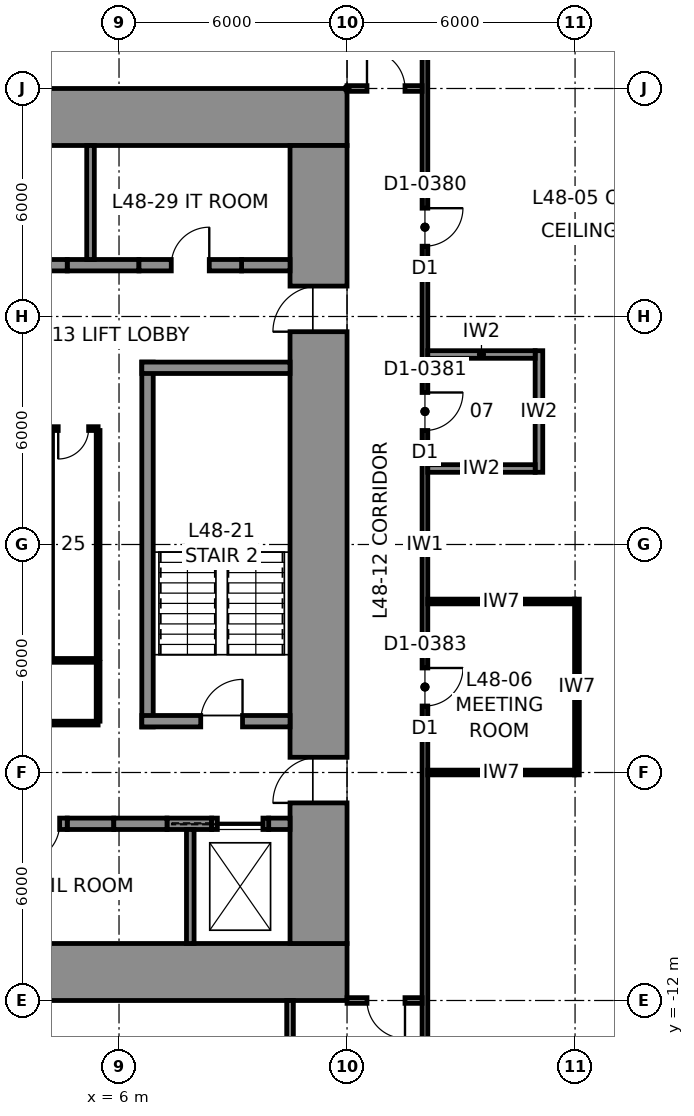
"""IFC4 building model, lengths in metres.
Left out: names, types, materials, properties, quantities, classifications, styles, units other than length and angle.
Written with IfcOpenShell. Run it as: python <this file> out.ifc"""

import sys

from ifc_helpers import new_model, si_unit, direction, frame, frame_2d, origin, place, context, subcontext, project, spatial, rectangle, extrude, element, fill, save


model = new_model("IFC4")
c1 = context("Model", 3, precision=1e-05, world=origin(), true_north=direction((0.0, 1.0)))
c2 = subcontext(c1, "Body", "Model", "MODEL_VIEW")
j1 = project(units=[si_unit("LENGTHUNIT", "METRE"), si_unit("PLANEANGLEUNIT", "RADIAN")], contexts=[c1])
p1 = place(None, origin())
s1 = spatial("IfcSite", under=j1, at=p1, CompositionType="ELEMENT")
p2 = place(p1, origin())
s2 = spatial("IfcBuilding", under=s1, at=p2, CompositionType="ELEMENT")
p3 = place(p2, frame((0.0, 0.0, 221.8)))
s3 = spatial("IfcBuildingStorey", under=s2, at=p3, CompositionType="ELEMENT", Elevation=221.8)
for number, where, z_axis, x_axis in (
    (1, (-12.0, 11.25, 0.0), (0.0, 0.0, 1.0), (1.0, 0.0, 0.0)),
    (2, (12.0, -11.25, 0.0), (0.0, 0.0, 1.0), (-1.0, 0.0, 0.0)),
):
    element("IfcWall", number, at=place(p3, frame(where, z_axis=z_axis, x_axis=x_axis)), inside=s3, PredefinedType="SHEAR", context=c2, shape_type="SweptSolid", body=[
        extrude(rectangle(XDim=24.0, YDim=1.5, at=frame_2d((12.0, 0.0))), origin(), (0.0, 0.0, 1.0), 4.0),
    ])
p4 = place(p3, frame((11.25, 10.5, 0.0), z_axis=(0.0, 0.0, 1.0), x_axis=(0.0, -1.0, 0.0)))
e3 = element("IfcWall", 3, at=p4, inside=s3, PredefinedType="SHEAR", context=c2, shape_type="SweptSolid", body=[
    extrude(rectangle(XDim=21.0, YDim=1.5, at=frame_2d((10.5, 0.0))), origin(), (0.0, 0.0, 1.0), 4.0),
])
p5 = place(p4, frame((3.7, 0.0, 0.0)))
e4 = element("IfcOpeningElement", 4, at=p5, cuts=e3, PredefinedType="OPENING", context=c2, shape_type="SweptSolid", body=[
    extrude(rectangle(XDim=1.2, YDim=2.3, at=frame_2d((0.6, 1.15))), frame((0.0, 0.76, 0.0), z_axis=(0.0, -1.0, 0.0), x_axis=(1.0, 0.0, 0.0)), (0.0, 0.0, 1.0), 1.52),
])
p6 = place(p4, frame((16.1, 0.0, 0.0)))
e5 = element("IfcOpeningElement", 5, at=p6, cuts=e3, PredefinedType="OPENING", context=c2, shape_type="SweptSolid", body=[
    extrude(rectangle(XDim=1.2, YDim=2.3, at=frame_2d((0.6, 1.15))), frame((0.0, 0.76, 0.0), z_axis=(0.0, -1.0, 0.0), x_axis=(1.0, 0.0, 0.0)), (0.0, 0.0, 1.0), 1.52),
])
p7 = place(p3, frame((4.637, 7.35, 0.0), z_axis=(0.0, 0.0, 1.0), x_axis=(1.0, 0.0, 0.0)))
e6 = element("IfcWall", 6, at=p7, inside=s3, PredefinedType="SHEAR", context=c2, shape_type="SweptSolid", body=[
    extrude(rectangle(XDim=1.887, YDim=0.3, at=frame_2d((0.944, 0.0))), origin(), (0.0, 0.0, 1.0), 4.0),
])
p8 = place(p3, frame((9.225, 7.35, 0.0), z_axis=(0.0, 0.0, 1.0), x_axis=(1.0, 0.0, 0.0)))
e7 = element("IfcWall", 7, at=p8, inside=s3, PredefinedType="SHEAR", context=c2, shape_type="SweptSolid", body=[
    extrude(rectangle(XDim=1.275, YDim=0.3, at=frame_2d((0.637, 0.0))), origin(), (0.0, 0.0, 1.0), 4.0),
])
p9 = place(p3, frame((3.238, 7.35, 0.0), z_axis=(0.0, 0.0, 1.0), x_axis=(1.0, 0.0, 0.0)))
e8 = element("IfcWall", 8, at=p9, inside=s3, PredefinedType="PARTITIONING", context=c2, shape_type="SweptSolid", body=[
    extrude(rectangle(XDim=1.4, YDim=0.3, at=frame_2d((0.7, 0.0))), origin(), (0.0, 0.0, 1.0), 4.0),
])
p10 = place(p3, frame((6.525, 7.35, 0.0), z_axis=(0.0, 0.0, 1.0), x_axis=(1.0, 0.0, 0.0)))
e9 = element("IfcWall", 9, at=p10, inside=s3, PredefinedType="PARTITIONING", context=c2, shape_type="SweptSolid", body=[
    extrude(rectangle(XDim=2.7, YDim=0.3, at=frame_2d((1.35, 0.0))), origin(), (0.0, 0.0, 1.0), 4.0),
])
p11 = place(p10, frame((0.85, 0.0, 0.0)))
e10 = element("IfcOpeningElement", 10, at=p11, cuts=e9, PredefinedType="OPENING", context=c2, shape_type="SweptSolid", body=[
    extrude(rectangle(XDim=1.0, YDim=2.3, at=frame_2d((0.5, 1.15))), frame((0.0, 0.16, 0.0), z_axis=(0.0, -1.0, 0.0), x_axis=(1.0, 0.0, 0.0)), (0.0, 0.0, 1.0), 0.32),
])
p12 = place(p3, frame((5.25, 7.5, 0.0), z_axis=(0.0, 0.0, 1.0), x_axis=(0.0, 1.0, 0.0)))
e11 = element("IfcWall", 11, at=p12, inside=s3, PredefinedType="PARTITIONING", context=c2, shape_type="SweptSolid", body=[
    extrude(rectangle(XDim=3.0, YDim=0.2, at=frame_2d((1.5, 0.0))), origin(), (0.0, 0.0, 1.0), 4.0),
])
p13 = place(p3, frame((4.637, -7.35, 0.0), z_axis=(0.0, 0.0, 1.0), x_axis=(1.0, 0.0, 0.0)))
e12 = element("IfcWall", 12, at=p13, inside=s3, PredefinedType="SHEAR", context=c2, shape_type="SweptSolid", body=[
    extrude(rectangle(XDim=1.225, YDim=0.3, at=frame_2d((0.613, 0.0))), origin(), (0.0, 0.0, 1.0), 4.0),
])
p14 = place(p3, frame((7.262, -7.35, 0.0), z_axis=(0.0, 0.0, 1.0), x_axis=(1.0, 0.0, 0.0)))
e13 = element("IfcWall", 13, at=p14, inside=s3, PredefinedType="SHEAR", context=c2, shape_type="SweptSolid", body=[
    extrude(rectangle(XDim=1.175, YDim=0.3, at=frame_2d((0.587, 0.0))), origin(), (0.0, 0.0, 1.0), 4.0),
])
p15 = place(p3, frame((9.938, -7.35, 0.0), z_axis=(0.0, 0.0, 1.0), x_axis=(1.0, 0.0, 0.0)))
e14 = element("IfcWall", 14, at=p15, inside=s3, PredefinedType="SHEAR", context=c2, shape_type="SweptSolid", body=[
    extrude(rectangle(XDim=0.562, YDim=0.3, at=frame_2d((0.281, 0.0))), origin(), (0.0, 0.0, 1.0), 4.0),
])
p16 = place(p3, frame((3.238, -7.35, 0.0), z_axis=(0.0, 0.0, 1.0), x_axis=(1.0, 0.0, 0.0)))
e15 = element("IfcWall", 15, at=p16, inside=s3, PredefinedType="PARTITIONING", context=c2, shape_type="SweptSolid", body=[
    extrude(rectangle(XDim=1.4, YDim=0.3, at=frame_2d((0.7, 0.0))), origin(), (0.0, 0.0, 1.0), 4.0),
])
p17 = place(p16, frame((0.2, 0.0, 0.0)))
e16 = element("IfcOpeningElement", 16, at=p17, cuts=e15, PredefinedType="OPENING", context=c2, shape_type="SweptSolid", body=[
    extrude(rectangle(XDim=1.0, YDim=2.3, at=frame_2d((0.5, 1.15))), frame((0.0, 0.16, 0.0), z_axis=(0.0, -1.0, 0.0), x_axis=(1.0, 0.0, 0.0)), (0.0, 0.0, 1.0), 0.32),
])
p18 = place(p3, frame((5.863, -7.35, 0.0), z_axis=(0.0, 0.0, 1.0), x_axis=(1.0, 0.0, 0.0)))
e17 = element("IfcWall", 17, at=p18, inside=s3, PredefinedType="PARTITIONING", context=c2, shape_type="SweptSolid", body=[
    extrude(rectangle(XDim=1.4, YDim=0.3, at=frame_2d((0.7, 0.0))), origin(), (0.0, 0.0, 1.0), 4.0),
])
p19 = place(p3, frame((8.438, -7.35, 0.0), z_axis=(0.0, 0.0, 1.0), x_axis=(1.0, 0.0, 0.0)))
e18 = element("IfcWall", 18, at=p19, inside=s3, PredefinedType="PARTITIONING", context=c2, shape_type="SweptSolid", body=[
    extrude(rectangle(XDim=1.5, YDim=0.3, at=frame_2d((0.75, 0.0))), origin(), (0.0, 0.0, 1.0), 4.0),
])
p20 = place(p19, frame((0.15, 0.0, 0.0)))
e19 = element("IfcOpeningElement", 19, at=p20, cuts=e18, PredefinedType="OPENING", context=c2, shape_type="SweptSolid", body=[
    extrude(rectangle(XDim=1.2, YDim=2.3, at=frame_2d((0.6, 1.15))), frame((0.0, 0.16, 0.0), z_axis=(0.0, -1.0, 0.0), x_axis=(1.0, 0.0, 0.0)), (0.0, 0.0, 1.0), 0.32),
])
p21 = place(p3, frame((7.875, -10.5, 0.0), z_axis=(0.0, 0.0, 1.0), x_axis=(0.0, 1.0, 0.0)))
e20 = element("IfcWall", 20, at=p21, inside=s3, PredefinedType="PARTITIONING", context=c2, shape_type="SweptSolid", body=[
    extrude(rectangle(XDim=3.0, YDim=0.2, at=frame_2d((1.5, 0.0))), origin(), (0.0, 0.0, 1.0), 4.0),
])
p22 = place(p3, frame((14.05, -13.575, 0.0), z_axis=(0.0, 0.0, 1.0), x_axis=(0.0, 1.0, 0.0)))
e21 = element("IfcWall", 21, at=p22, inside=s3, PredefinedType="PARTITIONING", context=c2, shape_type="SweptSolid", body=[
    extrude(rectangle(XDim=27.15, YDim=0.15, at=frame_2d((13.575, 0.0))), origin(), (0.0, 0.0, 1.0), 3.83),
])
p23 = place(p22, frame((21.425, 0.0, 0.0)))
e22 = element("IfcOpeningElement", 22, at=p23, cuts=e21, PredefinedType="OPENING", context=c2, shape_type="SweptSolid", body=[
    extrude(rectangle(XDim=1.0, YDim=2.3, at=frame_2d((0.5, 1.15))), frame((0.0, 0.085, 0.0), z_axis=(0.0, -1.0, 0.0), x_axis=(1.0, 0.0, 0.0)), (0.0, 0.0, 1.0), 0.17),
])
p24 = place(p22, frame((9.325, 0.0, 0.0)))
e23 = element("IfcOpeningElement", 23, at=p24, cuts=e21, PredefinedType="OPENING", context=c2, shape_type="SweptSolid", body=[
    extrude(rectangle(XDim=1.0, YDim=2.3, at=frame_2d((0.5, 1.15))), frame((0.0, 0.085, 0.0), z_axis=(0.0, -1.0, 0.0), x_axis=(1.0, 0.0, 0.0)), (0.0, 0.0, 1.0), 0.17),
])
p25 = place(p22, frame((16.575, 0.0, 0.0)))
e24 = element("IfcOpeningElement", 24, at=p25, cuts=e21, PredefinedType="OPENING", context=c2, shape_type="SweptSolid", body=[
    extrude(rectangle(XDim=1.0, YDim=2.3, at=frame_2d((0.5, 1.15))), frame((0.0, 0.085, 0.0), z_axis=(0.0, -1.0, 0.0), x_axis=(1.0, 0.0, 0.0)), (0.0, 0.0, 1.0), 0.17),
])
p26 = place(p3, frame((12.0, 12.0, 0.0), z_axis=(0.0, 0.0, 1.0), x_axis=(1.0, 0.0, 0.0)))
e25 = element("IfcWall", 25, at=p26, inside=s3, PredefinedType="PARTITIONING", context=c2, shape_type="SweptSolid", body=[
    extrude(rectangle(XDim=1.975, YDim=0.15, at=frame_2d((0.988, 0.0))), origin(), (0.0, 0.0, 1.0), 3.83),
])
p27 = place(p26, frame((0.525, 0.0, 0.0)))
e26 = element("IfcOpeningElement", 26, at=p27, cuts=e25, PredefinedType="OPENING", context=c2, shape_type="SweptSolid", body=[
    extrude(rectangle(XDim=1.0, YDim=2.3, at=frame_2d((0.5, 1.15))), frame((0.0, 0.085, 0.0), z_axis=(0.0, -1.0, 0.0), x_axis=(1.0, 0.0, 0.0)), (0.0, 0.0, 1.0), 0.17),
])
p28 = place(p3, frame((13.975, -12.0, 0.0), z_axis=(0.0, 0.0, 1.0), x_axis=(-1.0, 0.0, 0.0)))
e27 = element("IfcWall", 27, at=p28, inside=s3, PredefinedType="PARTITIONING", context=c2, shape_type="SweptSolid", body=[
    extrude(rectangle(XDim=1.975, YDim=0.15, at=frame_2d((0.988, 0.0))), origin(), (0.0, 0.0, 1.0), 3.83),
])
p29 = place(p28, frame((0.45, 0.0, 0.0)))
e28 = element("IfcOpeningElement", 28, at=p29, cuts=e27, PredefinedType="OPENING", context=c2, shape_type="SweptSolid", body=[
    extrude(rectangle(XDim=1.0, YDim=2.3, at=frame_2d((0.5, 1.15))), frame((0.0, 0.085, 0.0), z_axis=(0.0, -1.0, 0.0), x_axis=(1.0, 0.0, 0.0)), (0.0, 0.0, 1.0), 0.17),
])
p30 = place(p3, frame((10.5, -12.0, 0.0), z_axis=(0.0, 0.0, 1.0), x_axis=(0.0, -1.0, 0.0)))
e29 = element("IfcWall", 29, at=p30, inside=s3, PredefinedType="PARTITIONING", context=c2, shape_type="SweptSolid", body=[
    extrude(rectangle(XDim=11.15, YDim=0.175, at=frame_2d((5.575, 0.0))), origin(), (0.0, 0.0, 1.0), 3.83),
])
p31 = place(p3, frame((18.05, -6.062, 0.0), z_axis=(0.0, 0.0, 1.0), x_axis=(0.0, 1.0, 0.0)))
e30 = element("IfcWall", 30, at=p31, inside=s3, PredefinedType="PARTITIONING", context=c2, shape_type="SweptSolid", body=[
    extrude(rectangle(XDim=4.625, YDim=0.125, at=frame_2d((2.312, 0.0))), origin(), (0.0, 0.0, 1.0), 3.83),
])
for number, where, z_axis, x_axis in (
    (31, (14.125, -6.0, 0.0), (0.0, 0.0, 1.0), (1.0, 0.0, 0.0)),
    (32, (14.125, -1.5, 0.0), (0.0, 0.0, 1.0), (1.0, 0.0, 0.0)),
):
    element("IfcWall", number, at=place(p3, frame(where, z_axis=z_axis, x_axis=x_axis)), inside=s3, PredefinedType="PARTITIONING", context=c2, shape_type="SweptSolid", body=[
        extrude(rectangle(XDim=3.863, YDim=0.125, at=frame_2d((1.931, 0.0))), origin(), (0.0, 0.0, 1.0), 3.83),
    ])
p32 = place(p3, frame((17.05, 1.9, 0.0), z_axis=(0.0, 0.0, 1.0), x_axis=(0.0, 1.0, 0.0)))
e33 = element("IfcWall", 33, at=p32, inside=s3, PredefinedType="PARTITIONING", context=c2, shape_type="SweptSolid", body=[
    extrude(rectangle(XDim=3.2, YDim=0.2, at=frame_2d((1.6, 0.0))), origin(), (0.0, 0.0, 1.0), 3.83),
])
for number, where, z_axis, x_axis in (
    (34, (14.125, 2.0, 0.0), (0.0, 0.0, 1.0), (1.0, 0.0, 0.0)),
    (35, (14.125, 5.0, 0.0), (0.0, 0.0, 1.0), (1.0, 0.0, 0.0)),
):
    element("IfcWall", number, at=place(p3, frame(where, z_axis=z_axis, x_axis=x_axis)), inside=s3, PredefinedType="PARTITIONING", context=c2, shape_type="SweptSolid", body=[
        extrude(rectangle(XDim=2.825, YDim=0.2, at=frame_2d((1.413, 0.0))), origin(), (0.0, 0.0, 1.0), 3.83),
    ])
p33 = place(p3, frame((6.75, -4.8, 0.0), z_axis=(0.0, 0.0, 1.0), x_axis=(0.0, 1.0, 0.0)))
e36 = element("IfcWall", 36, at=p33, inside=s3, PredefinedType="SOLIDWALL", context=c2, shape_type="SweptSolid", body=[
    extrude(rectangle(XDim=9.6, YDim=0.3, at=frame_2d((4.8, 0.0))), origin(), (0.0, 0.0, 1.0), 3.75),
])
p34 = place(p3, frame((6.6, 4.65, 0.0), z_axis=(0.0, 0.0, 1.0), x_axis=(1.0, 0.0, 0.0)))
e37 = element("IfcWall", 37, at=p34, inside=s3, PredefinedType="SOLIDWALL", context=c2, shape_type="SweptSolid", body=[
    extrude(rectangle(XDim=3.9, YDim=0.3, at=frame_2d((1.95, 0.0))), origin(), (0.0, 0.0, 1.0), 3.75),
])
p35 = place(p3, frame((10.5, -4.65, 0.0), z_axis=(0.0, 0.0, 1.0), x_axis=(-1.0, 0.0, 0.0)))
e38 = element("IfcWall", 38, at=p35, inside=s3, PredefinedType="SOLIDWALL", context=c2, shape_type="SweptSolid", body=[
    extrude(rectangle(XDim=3.9, YDim=0.3, at=frame_2d((1.95, 0.0))), origin(), (0.0, 0.0, 1.0), 3.75),
])
p36 = place(p35, frame((1.25, 0.0, 0.0)))
e39 = element("IfcOpeningElement", 39, at=p36, cuts=e38, PredefinedType="OPENING", context=c2, shape_type="SweptSolid", body=[
    extrude(rectangle(XDim=1.1, YDim=2.3, at=frame_2d((0.55, 1.15))), frame((0.0, 0.16, 0.0), z_axis=(0.0, -1.0, 0.0), x_axis=(1.0, 0.0, 0.0)), (0.0, 0.0, 1.0), 0.32),
])
p37 = place(p3, frame((4.15, 3.05, 0.0), z_axis=(0.0, 0.0, 1.0), x_axis=(1.0, 0.0, 0.0)))
e40 = element("IfcWall", 40, at=p37, inside=s3, PredefinedType="PARTITIONING", context=c2, shape_type="SweptSolid", body=[
    extrude(rectangle(XDim=1.3, YDim=0.1, at=frame_2d((0.65, 0.0))), origin(), (0.0, 0.0, 1.0), 3.75),
])
p38 = place(p37, frame((0.25, 0.0, 0.0)))
e41 = element("IfcOpeningElement", 41, at=p38, cuts=e40, PredefinedType="OPENING", context=c2, shape_type="SweptSolid", body=[
    extrude(rectangle(XDim=0.8, YDim=2.3, at=frame_2d((0.4, 1.15))), frame((0.0, 0.06, 0.0), z_axis=(0.0, -1.0, 0.0), x_axis=(1.0, 0.0, 0.0)), (0.0, 0.0, 1.0), 0.12),
])
p39 = place(p3, frame((5.45, -3.05, 0.0), z_axis=(0.0, 0.0, 1.0), x_axis=(-1.0, 0.0, 0.0)))
e42 = element("IfcWall", 42, at=p39, inside=s3, PredefinedType="PARTITIONING", context=c2, shape_type="SweptSolid", body=[
    extrude(rectangle(XDim=1.3, YDim=0.1, at=frame_2d((0.65, 0.0))), origin(), (0.0, 0.0, 1.0), 3.75),
])
p40 = place(p3, frame((5.45, 3.0, 0.0), z_axis=(0.0, 0.0, 1.0), x_axis=(0.0, -1.0, 0.0)))
e43 = element("IfcWall", 43, at=p40, inside=s3, PredefinedType="PARTITIONING", context=c2, shape_type="SweptSolid", body=[
    extrude(rectangle(XDim=6.0, YDim=0.1, at=frame_2d((3.0, 0.0))), origin(), (0.0, 0.0, 1.0), 3.75),
])
p41 = place(p3, frame((5.45, -4.7, 0.0), z_axis=(0.0, 0.0, 1.0), x_axis=(-1.0, 0.0, 0.0)))
e44 = element("IfcWall", 44, at=p41, inside=s3, PredefinedType="PARTITIONING", context=c2, shape_type="SweptSolid", body=[
    extrude(rectangle(XDim=10.9, YDim=0.1, at=frame_2d((5.45, 0.0))), origin(), (0.0, 0.0, 1.0), 3.75),
])
p42 = place(p41, frame((9.275, 0.0, 0.0)))
e45 = element("IfcOpeningElement", 45, at=p42, cuts=e44, PredefinedType="OPENING", context=c2, shape_type="SweptSolid", body=[
    extrude(rectangle(XDim=0.8, YDim=2.3, at=frame_2d((0.4, 1.15))), frame((0.0, 0.06, 0.0), z_axis=(0.0, -1.0, 0.0), x_axis=(1.0, 0.0, 0.0)), (0.0, 0.0, 1.0), 0.12),
])
p43 = place(p41, frame((7.45, 0.0, 0.0)))
e46 = element("IfcOpeningElement", 46, at=p43, cuts=e44, PredefinedType="OPENING", context=c2, shape_type="SweptSolid", body=[
    extrude(rectangle(XDim=0.8, YDim=2.3, at=frame_2d((0.4, 1.15))), frame((0.0, 0.06, 0.0), z_axis=(0.0, -1.0, 0.0), x_axis=(1.0, 0.0, 0.0)), (0.0, 0.0, 1.0), 0.12),
])
p44 = place(p41, frame((6.25, 0.0, 0.0)))
e47 = element("IfcOpeningElement", 47, at=p44, cuts=e44, PredefinedType="OPENING", context=c2, shape_type="SweptSolid", body=[
    extrude(rectangle(XDim=0.8, YDim=2.3, at=frame_2d((0.4, 1.15))), frame((0.0, 0.06, 0.0), z_axis=(0.0, -1.0, 0.0), x_axis=(1.0, 0.0, 0.0)), (0.0, 0.0, 1.0), 0.12),
])
p45 = place(p41, frame((4.625, 0.0, 0.0)))
e48 = element("IfcOpeningElement", 48, at=p45, cuts=e44, PredefinedType="OPENING", context=c2, shape_type="SweptSolid", body=[
    extrude(rectangle(XDim=0.8, YDim=2.3, at=frame_2d((0.4, 1.15))), frame((0.0, 0.06, 0.0), z_axis=(0.0, -1.0, 0.0), x_axis=(1.0, 0.0, 0.0)), (0.0, 0.0, 1.0), 0.12),
])
p46 = place(p41, frame((1.6, 0.0, 0.0)))
e49 = element("IfcOpeningElement", 49, at=p46, cuts=e44, PredefinedType="OPENING", context=c2, shape_type="SweptSolid", body=[
    extrude(rectangle(XDim=0.8, YDim=2.3, at=frame_2d((0.4, 1.15))), frame((0.0, 0.06, 0.0), z_axis=(0.0, -1.0, 0.0), x_axis=(1.0, 0.0, 0.0)), (0.0, 0.0, 1.0), 0.12),
])
p47 = place(p3, frame((5.45, -3.1, 0.0), z_axis=(0.0, 0.0, 1.0), x_axis=(0.0, -1.0, 0.0)))
e50 = element("IfcWall", 50, at=p47, inside=s3, PredefinedType="PARTITIONING", context=c2, shape_type="SweptSolid", body=[
    extrude(rectangle(XDim=1.55, YDim=0.1, at=frame_2d((0.775, 0.0))), origin(), (0.0, 0.0, 1.0), 3.75),
])
p48 = place(p27, origin())
e51 = element("IfcDoor", 51, at=p48, inside=s3, OperationType="SINGLE_SWING_LEFT", PredefinedType="DOOR", context=c2, shape_type="SweptSolid", body=[
    extrude(rectangle(XDim=1.0, YDim=2.3, at=frame_2d((0.5, 1.15))), frame((0.0, 0.025, 0.0), z_axis=(0.0, -1.0, 0.0), x_axis=(1.0, 0.0, 0.0)), (0.0, 0.0, 1.0), 0.05),
])
fill(e26, e51)
p49 = place(p29, origin())
e52 = element("IfcDoor", 52, at=p49, inside=s3, OperationType="SINGLE_SWING_LEFT", PredefinedType="DOOR", context=c2, shape_type="SweptSolid", body=[
    extrude(rectangle(XDim=1.0, YDim=2.3, at=frame_2d((0.5, 1.15))), frame((0.0, 0.025, 0.0), z_axis=(0.0, -1.0, 0.0), x_axis=(1.0, 0.0, 0.0)), (0.0, 0.0, 1.0), 0.05),
])
fill(e28, e52)
p50 = place(p23, frame((1.0, 0.0, 0.0), z_axis=(0.0, 0.0, 1.0), x_axis=(-1.0, 0.0, 0.0)))
e53 = element("IfcDoor", 53, at=p50, inside=s3, OperationType="SINGLE_SWING_LEFT", PredefinedType="DOOR", context=c2, shape_type="SweptSolid", body=[
    extrude(rectangle(XDim=1.0, YDim=2.3, at=frame_2d((0.5, 1.15))), frame((0.0, 0.025, 0.0), z_axis=(0.0, -1.0, 0.0), x_axis=(1.0, 0.0, 0.0)), (0.0, 0.0, 1.0), 0.05),
])
fill(e22, e53)
p51 = place(p24, frame((1.0, 0.0, 0.0), z_axis=(0.0, 0.0, 1.0), x_axis=(-1.0, 0.0, 0.0)))
e54 = element("IfcDoor", 54, at=p51, inside=s3, OperationType="SINGLE_SWING_LEFT", PredefinedType="DOOR", context=c2, shape_type="SweptSolid", body=[
    extrude(rectangle(XDim=1.0, YDim=2.3, at=frame_2d((0.5, 1.15))), frame((0.0, 0.025, 0.0), z_axis=(0.0, -1.0, 0.0), x_axis=(1.0, 0.0, 0.0)), (0.0, 0.0, 1.0), 0.05),
])
fill(e23, e54)
p52 = place(p25, frame((1.0, 0.0, 0.0), z_axis=(0.0, 0.0, 1.0), x_axis=(-1.0, 0.0, 0.0)))
e55 = element("IfcDoor", 55, at=p52, inside=s3, OperationType="SINGLE_SWING_LEFT", PredefinedType="DOOR", context=c2, shape_type="SweptSolid", body=[
    extrude(rectangle(XDim=1.0, YDim=2.3, at=frame_2d((0.5, 1.15))), frame((0.0, 0.025, 0.0), z_axis=(0.0, -1.0, 0.0), x_axis=(1.0, 0.0, 0.0)), (0.0, 0.0, 1.0), 0.05),
])
fill(e24, e55)
p53 = place(p36, frame((1.1, 0.0, 0.0), z_axis=(0.0, 0.0, 1.0), x_axis=(-1.0, 0.0, 0.0)))
e56 = element("IfcDoor", 56, at=p53, inside=s3, OperationType="SINGLE_SWING_RIGHT", PredefinedType="DOOR", context=c2, shape_type="SweptSolid", body=[
    extrude(rectangle(XDim=1.1, YDim=2.3, at=frame_2d((0.55, 1.15))), frame((0.0, 0.025, 0.0), z_axis=(0.0, -1.0, 0.0), x_axis=(1.0, 0.0, 0.0)), (0.0, 0.0, 1.0), 0.05),
])
fill(e39, e56)
p54 = place(p38, frame((0.8, 0.0, 0.0), z_axis=(0.0, 0.0, 1.0), x_axis=(-1.0, 0.0, 0.0)))
e57 = element("IfcDoor", 57, at=p54, inside=s3, OperationType="SINGLE_SWING_RIGHT", PredefinedType="DOOR", context=c2, shape_type="SweptSolid", body=[
    extrude(rectangle(XDim=0.8, YDim=2.3, at=frame_2d((0.4, 1.15))), frame((0.0, 0.025, 0.0), z_axis=(0.0, -1.0, 0.0), x_axis=(1.0, 0.0, 0.0)), (0.0, 0.0, 1.0), 0.05),
])
fill(e41, e57)
p55 = place(p11, origin())
e58 = element("IfcDoor", 58, at=p55, inside=s3, OperationType="SINGLE_SWING_RIGHT", PredefinedType="DOOR", context=c2, shape_type="SweptSolid", body=[
    extrude(rectangle(XDim=1.0, YDim=2.3, at=frame_2d((0.5, 1.15))), frame((0.0, 0.025, 0.0), z_axis=(0.0, -1.0, 0.0), x_axis=(1.0, 0.0, 0.0)), (0.0, 0.0, 1.0), 0.05),
])
fill(e10, e58)
p56 = place(p17, frame((1.0, 0.0, 0.0), z_axis=(0.0, 0.0, 1.0), x_axis=(-1.0, 0.0, 0.0)))
e59 = element("IfcDoor", 59, at=p56, inside=s3, OperationType="SINGLE_SWING_RIGHT", PredefinedType="DOOR", context=c2, shape_type="SweptSolid", body=[
    extrude(rectangle(XDim=1.0, YDim=2.3, at=frame_2d((0.5, 1.15))), frame((0.0, 0.025, 0.0), z_axis=(0.0, -1.0, 0.0), x_axis=(1.0, 0.0, 0.0)), (0.0, 0.0, 1.0), 0.05),
])
fill(e16, e59)
p57 = place(p5, frame((1.2, 0.0, 0.0), z_axis=(0.0, 0.0, 1.0), x_axis=(-1.0, 0.0, 0.0)))
e60 = element("IfcDoor", 60, at=p57, inside=s3, OperationType="SINGLE_SWING_LEFT", PredefinedType="DOOR", context=c2, shape_type="SweptSolid", body=[
    extrude(rectangle(XDim=1.2, YDim=2.3, at=frame_2d((0.6, 1.15))), frame((0.0, 0.025, 0.0), z_axis=(0.0, -1.0, 0.0), x_axis=(1.0, 0.0, 0.0)), (0.0, 0.0, 1.0), 0.05),
])
fill(e4, e60)
p58 = place(p6, frame((1.2, 0.0, 0.0), z_axis=(0.0, 0.0, 1.0), x_axis=(-1.0, 0.0, 0.0)))
e61 = element("IfcDoor", 61, at=p58, inside=s3, OperationType="SINGLE_SWING_LEFT", PredefinedType="DOOR", context=c2, shape_type="SweptSolid", body=[
    extrude(rectangle(XDim=1.2, YDim=2.3, at=frame_2d((0.6, 1.15))), frame((0.0, 0.025, 0.0), z_axis=(0.0, -1.0, 0.0), x_axis=(1.0, 0.0, 0.0)), (0.0, 0.0, 1.0), 0.05),
])
fill(e5, e61)
p59 = place(p20, origin())
e62 = element("IfcDoor", 62, at=p59, inside=s3, OperationType="SLIDING_TO_LEFT", PredefinedType="DOOR", context=c2, shape_type="SweptSolid", body=[
    extrude(rectangle(XDim=1.2, YDim=2.3, at=frame_2d((0.6, 1.15))), frame((0.0, 0.025, 0.0), z_axis=(0.0, -1.0, 0.0), x_axis=(1.0, 0.0, 0.0)), (0.0, 0.0, 1.0), 0.05),
])
fill(e19, e62)
save(model, sys.argv[1])
